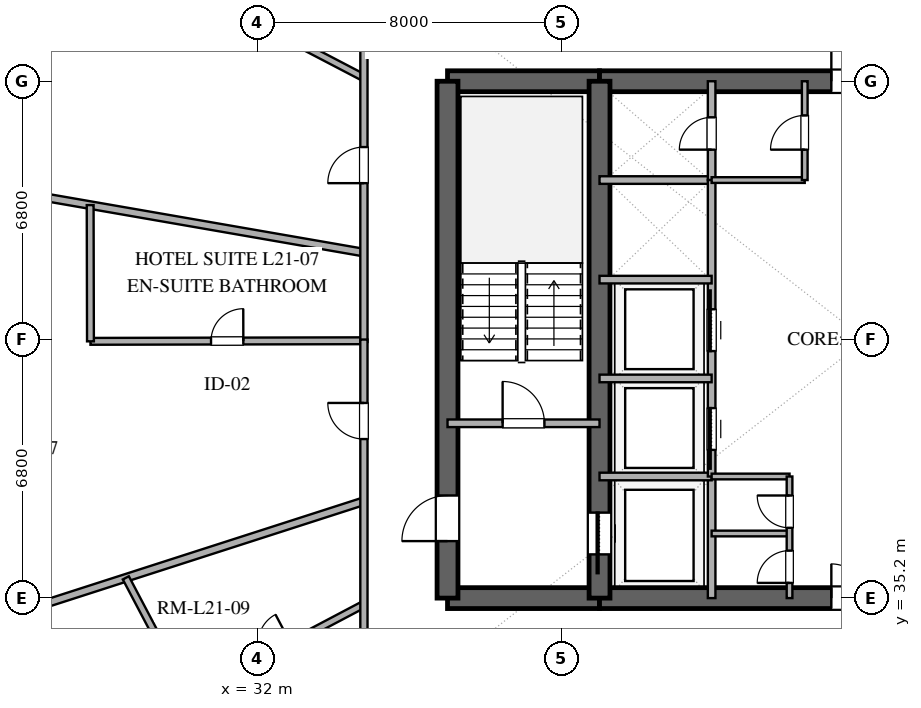
"""IFC4 building model, lengths in metres.
Left out: names, types, materials, properties, quantities, classifications, styles, units other than length and angle.
Written with IfcOpenShell. Run it as: python <this file> out.ifc"""

import sys

from ifc_helpers import new_model, si_unit, direction, frame, frame_2d, origin, place, context, subcontext, project, spatial, rectangle, extrude, element, fill, save


model = new_model("IFC4")
c1 = context("Model", 3, precision=1e-05, world=origin(), true_north=direction((0.0, 1.0)))
c2 = subcontext(c1, "Body", "Model", "MODEL_VIEW")
j1 = project(units=[si_unit("LENGTHUNIT", "METRE"), si_unit("PLANEANGLEUNIT", "RADIAN")], contexts=[c1])
p1 = place(None, origin())
s1 = spatial("IfcSite", under=j1, at=p1, CompositionType="ELEMENT")
p2 = place(p1, origin())
s2 = spatial("IfcBuilding", under=s1, at=p2, CompositionType="ELEMENT")
p3 = place(p2, frame((0.0, 0.0, 87.6)))
s3 = spatial("IfcBuildingStorey", under=s2, at=p3, CompositionType="ELEMENT", Elevation=87.6)
p4 = place(p3, frame((37.0, 35.2, 0.0), z_axis=(0.0, 0.0, 1.0), x_axis=(1.0, 0.0, 0.0)))
e1 = element("IfcWall", 1, at=p4, inside=s3, PredefinedType="SHEAR", context=c2, shape_type="SweptSolid", body=[
    extrude(rectangle(XDim=4.0, YDim=0.55, at=frame_2d((2.0, 0.0))), origin(), (0.0, 0.0, 1.0), 3.38),
])
p5 = place(p3, frame((41.0, 35.2, 0.0), z_axis=(0.0, 0.0, 1.0), x_axis=(1.0, 0.0, 0.0)))
e2 = element("IfcWall", 2, at=p5, inside=s3, PredefinedType="SHEAR", context=c2, shape_type="SweptSolid", body=[
    extrude(rectangle(XDim=14.0, YDim=0.55, at=frame_2d((7.0, 0.0))), origin(), (0.0, 0.0, 1.0), 3.38),
])
p6 = place(p5, frame((6.1, 0.0, 0.0)))
e3 = element("IfcOpeningElement", 3, at=p6, cuts=e2, PredefinedType="OPENING", context=c2, shape_type="SweptSolid", body=[
    extrude(rectangle(XDim=1.8, YDim=2.25, at=frame_2d((0.9, 1.125))), frame((0.0, 0.285, 0.0), z_axis=(0.0, -1.0, 0.0), x_axis=(1.0, 0.0, 0.0)), (0.0, 0.0, 1.0), 0.57),
])
p7 = place(p3, frame((37.0, 48.8, 0.0), z_axis=(0.0, 0.0, 1.0), x_axis=(1.0, 0.0, 0.0)))
e4 = element("IfcWall", 4, at=p7, inside=s3, PredefinedType="SHEAR", context=c2, shape_type="SweptSolid", body=[
    extrude(rectangle(XDim=4.0, YDim=0.55, at=frame_2d((2.0, 0.0))), origin(), (0.0, 0.0, 1.0), 3.38),
])
p8 = place(p3, frame((41.0, 48.8, 0.0), z_axis=(0.0, 0.0, 1.0), x_axis=(1.0, 0.0, 0.0)))
e5 = element("IfcWall", 5, at=p8, inside=s3, PredefinedType="SHEAR", context=c2, shape_type="SweptSolid", body=[
    extrude(rectangle(XDim=14.0, YDim=0.55, at=frame_2d((7.0, 0.0))), origin(), (0.0, 0.0, 1.0), 3.38),
])
p9 = place(p8, frame((6.1, 0.0, 0.0)))
e6 = element("IfcOpeningElement", 6, at=p9, cuts=e5, PredefinedType="OPENING", context=c2, shape_type="SweptSolid", body=[
    extrude(rectangle(XDim=1.8, YDim=2.25, at=frame_2d((0.9, 1.125))), frame((0.0, 0.285, 0.0), z_axis=(0.0, -1.0, 0.0), x_axis=(1.0, 0.0, 0.0)), (0.0, 0.0, 1.0), 0.57),
])
p10 = place(p3, frame((37.0, 35.2, 0.0), z_axis=(0.0, 0.0, 1.0), x_axis=(0.0, 1.0, 0.0)))
e7 = element("IfcWall", 7, at=p10, inside=s3, PredefinedType="SHEAR", context=c2, shape_type="SweptSolid", body=[
    extrude(rectangle(XDim=13.6, YDim=0.55, at=frame_2d((6.8, 0.0))), origin(), (0.0, 0.0, 1.0), 3.38),
])
p11 = place(p10, frame((1.5, 0.0, 0.0)))
e8 = element("IfcOpeningElement", 8, at=p11, cuts=e7, PredefinedType="OPENING", context=c2, shape_type="SweptSolid", body=[
    extrude(rectangle(XDim=1.2, YDim=2.15, at=frame_2d((0.6, 1.075))), frame((0.0, 0.285, 0.0), z_axis=(0.0, -1.0, 0.0), x_axis=(1.0, 0.0, 0.0)), (0.0, 0.0, 1.0), 0.57),
])
p12 = place(p3, frame((41.0, 35.2, 0.0), z_axis=(0.0, 0.0, 1.0), x_axis=(0.0, 1.0, 0.0)))
e9 = element("IfcWall", 9, at=p12, inside=s3, PredefinedType="SHEAR", context=c2, shape_type="SweptSolid", body=[
    extrude(rectangle(XDim=13.6, YDim=0.55, at=frame_2d((6.8, 0.0))), origin(), (0.0, 0.0, 1.0), 3.38),
])
p13 = place(p12, frame((1.15, 0.0, 0.0)))
e10 = element("IfcOpeningElement", 10, at=p13, cuts=e9, PredefinedType="OPENING", context=c2, shape_type="SweptSolid", body=[
    extrude(rectangle(XDim=1.1, YDim=2.2, at=frame_2d((0.55, 1.1))), frame((0.0, 0.285, 0.0), z_axis=(0.0, -1.0, 0.0), x_axis=(1.0, 0.0, 0.0)), (0.0, 0.0, 1.0), 0.57),
])
p14 = place(p3, frame((37.0, 39.8, 0.0), z_axis=(0.0, 0.0, 1.0), x_axis=(1.0, 0.0, 0.0)))
e11 = element("IfcWall", 11, at=p14, inside=s3, PredefinedType="SOLIDWALL", context=c2, shape_type="SweptSolid", body=[
    extrude(rectangle(XDim=4.0, YDim=0.2, at=frame_2d((2.0, 0.0))), origin(), (0.0, 0.0, 1.0), 2.74),
])
p15 = place(p14, frame((1.45, 0.0, 0.0)))
e12 = element("IfcOpeningElement", 12, at=p15, cuts=e11, PredefinedType="OPENING", context=c2, shape_type="SweptSolid", body=[
    extrude(rectangle(XDim=1.1, YDim=2.15, at=frame_2d((0.55, 1.075))), frame((0.0, 0.11, 0.0), z_axis=(0.0, -1.0, 0.0), x_axis=(1.0, 0.0, 0.0)), (0.0, 0.0, 1.0), 0.22),
])
p16 = place(p3, frame((43.95, 35.2, 0.0), z_axis=(0.0, 0.0, 1.0), x_axis=(0.0, 1.0, 0.0)))
e13 = element("IfcWall", 13, at=p16, inside=s3, PredefinedType="SOLIDWALL", context=c2, shape_type="SweptSolid", body=[
    extrude(rectangle(XDim=3.2, YDim=0.2, at=frame_2d((1.6, 0.0))), origin(), (0.0, 0.0, 1.0), 2.74),
])
for number, where, z_axis, x_axis in (
    (14, (41.0, 38.4, 0.0), (0.0, 0.0, 1.0), (1.0, 0.0, 0.0)),
    (15, (41.0, 46.2, 0.0), (0.0, 0.0, 1.0), (1.0, 0.0, 0.0)),
):
    element("IfcWall", number, at=place(p3, frame(where, z_axis=z_axis, x_axis=x_axis)), inside=s3, PredefinedType="SOLIDWALL", context=c2, shape_type="SweptSolid", body=[
        extrude(rectangle(XDim=2.95, YDim=0.2, at=frame_2d((1.475, 0.0))), origin(), (0.0, 0.0, 1.0), 2.74),
    ])
p17 = place(p3, frame((43.95, 46.2, 0.0), z_axis=(0.0, 0.0, 1.0), x_axis=(0.0, 1.0, 0.0)))
e16 = element("IfcWall", 16, at=p17, inside=s3, PredefinedType="SOLIDWALL", context=c2, shape_type="SweptSolid", body=[
    extrude(rectangle(XDim=2.6, YDim=0.2, at=frame_2d((1.3, 0.0))), origin(), (0.0, 0.0, 1.0), 2.74),
])
p18 = place(p17, frame((0.8, 0.0, 0.0)))
e17 = element("IfcOpeningElement", 17, at=p18, cuts=e16, PredefinedType="OPENING", context=c2, shape_type="SweptSolid", body=[
    extrude(rectangle(XDim=0.85, YDim=2.15, at=frame_2d((0.425, 1.075))), frame((0.0, 0.11, 0.0), z_axis=(0.0, -1.0, 0.0), x_axis=(1.0, 0.0, 0.0)), (0.0, 0.0, 1.0), 0.22),
])
p19 = place(p3, frame((43.95, 38.4, 0.0), z_axis=(0.0, 0.0, 1.0), x_axis=(0.0, 1.0, 0.0)))
e18 = element("IfcWall", 18, at=p19, inside=s3, PredefinedType="SOLIDWALL", context=c2, shape_type="SweptSolid", body=[
    extrude(rectangle(XDim=7.8, YDim=0.2, at=frame_2d((3.9, 0.0))), origin(), (0.0, 0.0, 1.0), 2.74),
])
p20 = place(p19, frame((0.7, 0.0, 0.0)))
e19 = element("IfcOpeningElement", 19, at=p20, cuts=e18, PredefinedType="OPENING", context=c2, shape_type="SweptSolid", body=[
    extrude(rectangle(XDim=1.1, YDim=2.2, at=frame_2d((0.55, 1.1))), frame((0.0, 0.11, 0.0), z_axis=(0.0, -1.0, 0.0), x_axis=(1.0, 0.0, 0.0)), (0.0, 0.0, 1.0), 0.22),
])
p21 = place(p19, frame((3.3, 0.0, 0.0)))
e20 = element("IfcOpeningElement", 20, at=p21, cuts=e18, PredefinedType="OPENING", context=c2, shape_type="SweptSolid", body=[
    extrude(rectangle(XDim=1.1, YDim=2.2, at=frame_2d((0.55, 1.1))), frame((0.0, 0.11, 0.0), z_axis=(0.0, -1.0, 0.0), x_axis=(1.0, 0.0, 0.0)), (0.0, 0.0, 1.0), 0.22),
])
for number, where, z_axis, x_axis in (
    (21, (41.0, 40.98, 0.0), (0.0, 0.0, 1.0), (1.0, 0.0, 0.0)),
    (22, (41.0, 43.58, 0.0), (0.0, 0.0, 1.0), (1.0, 0.0, 0.0)),
):
    element("IfcWall", number, at=place(p3, frame(where, z_axis=z_axis, x_axis=x_axis)), inside=s3, PredefinedType="SOLIDWALL", context=c2, shape_type="SweptSolid", body=[
        extrude(rectangle(XDim=2.95, YDim=0.2, at=frame_2d((1.475, 0.0))), origin(), (0.0, 0.0, 1.0), 2.74),
    ])
for number, where, z_axis, x_axis in (
    (23, (43.95, 36.9, 0.0), (0.0, 0.0, 1.0), (1.0, 0.0, 0.0)),
    (24, (43.95, 38.4, 0.0), (0.0, 0.0, 1.0), (1.0, 0.0, 0.0)),
):
    element("IfcWall", number, at=place(p3, frame(where, z_axis=z_axis, x_axis=x_axis)), inside=s3, PredefinedType="PARTITIONING", context=c2, shape_type="SweptSolid", body=[
        extrude(rectangle(XDim=2.05, YDim=0.15, at=frame_2d((1.025, 0.0))), origin(), (0.0, 0.0, 1.0), 2.74),
    ])
p22 = place(p3, frame((46.0, 35.2, 0.0), z_axis=(0.0, 0.0, 1.0), x_axis=(0.0, 1.0, 0.0)))
e25 = element("IfcWall", 25, at=p22, inside=s3, PredefinedType="PARTITIONING", context=c2, shape_type="SweptSolid", body=[
    extrude(rectangle(XDim=3.2, YDim=0.15, at=frame_2d((1.6, 0.0))), origin(), (0.0, 0.0, 1.0), 2.74),
])
p23 = place(p22, frame((0.4, 0.0, 0.0)))
e26 = element("IfcOpeningElement", 26, at=p23, cuts=e25, PredefinedType="OPENING", context=c2, shape_type="SweptSolid", body=[
    extrude(rectangle(XDim=0.85, YDim=2.15, at=frame_2d((0.425, 1.075))), frame((0.0, 0.085, 0.0), z_axis=(0.0, -1.0, 0.0), x_axis=(1.0, 0.0, 0.0)), (0.0, 0.0, 1.0), 0.17),
])
p24 = place(p22, frame((1.85, 0.0, 0.0)))
e27 = element("IfcOpeningElement", 27, at=p24, cuts=e25, PredefinedType="OPENING", context=c2, shape_type="SweptSolid", body=[
    extrude(rectangle(XDim=0.85, YDim=2.15, at=frame_2d((0.425, 1.075))), frame((0.0, 0.085, 0.0), z_axis=(0.0, -1.0, 0.0), x_axis=(1.0, 0.0, 0.0)), (0.0, 0.0, 1.0), 0.17),
])
p25 = place(p3, frame((43.95, 46.2, 0.0), z_axis=(0.0, 0.0, 1.0), x_axis=(1.0, 0.0, 0.0)))
e28 = element("IfcWall", 28, at=p25, inside=s3, PredefinedType="PARTITIONING", context=c2, shape_type="SweptSolid", body=[
    extrude(rectangle(XDim=2.45, YDim=0.15, at=frame_2d((1.225, 0.0))), origin(), (0.0, 0.0, 1.0), 2.74),
])
p26 = place(p3, frame((46.4, 46.2, 0.0), z_axis=(0.0, 0.0, 1.0), x_axis=(0.0, 1.0, 0.0)))
e29 = element("IfcWall", 29, at=p26, inside=s3, PredefinedType="PARTITIONING", context=c2, shape_type="SweptSolid", body=[
    extrude(rectangle(XDim=2.6, YDim=0.15, at=frame_2d((1.3, 0.0))), origin(), (0.0, 0.0, 1.0), 2.74),
])
p27 = place(p26, frame((0.8, 0.0, 0.0)))
e30 = element("IfcOpeningElement", 30, at=p27, cuts=e29, PredefinedType="OPENING", context=c2, shape_type="SweptSolid", body=[
    extrude(rectangle(XDim=0.9, YDim=2.15, at=frame_2d((0.45, 1.075))), frame((0.0, 0.085, 0.0), z_axis=(0.0, -1.0, 0.0), x_axis=(1.0, 0.0, 0.0)), (0.0, 0.0, 1.0), 0.17),
])
p28 = place(p3, frame((34.8, 37.75, 0.0), z_axis=(0.0, 0.0, 1.0), x_axis=(-0.951880556228, -0.306469258939, 0.0)))
e31 = element("IfcWall", 31, at=p28, inside=s3, PredefinedType="PARTITIONING", context=c2, shape_type="SweptSolid", body=[
    extrude(rectangle(XDim=14.428, YDim=0.2, at=frame_2d((7.214, 0.0))), origin(), (0.0, 0.0, 1.0), 2.74),
])
p29 = place(p3, frame((34.8, 44.291, 0.0), z_axis=(0.0, 0.0, 1.0), x_axis=(-0.985271938133, 0.170994759944, 0.0)))
e32 = element("IfcWall", 32, at=p29, inside=s3, PredefinedType="PARTITIONING", context=c2, shape_type="SweptSolid", body=[
    extrude(rectangle(XDim=14.872, YDim=0.2, at=frame_2d((7.436, 0.0))), origin(), (0.0, 0.0, 1.0), 2.74),
])
p30 = place(p3, frame((27.604, 41.956, 0.0), z_axis=(0.0, 0.0, 1.0), x_axis=(0.999997715604, 0.002137472216, 0.0)))
e33 = element("IfcWall", 33, at=p30, inside=s3, PredefinedType="PLUMBINGWALL", context=c2, shape_type="SweptSolid", body=[
    extrude(rectangle(XDim=7.196, YDim=0.18, at=frame_2d((3.598, 0.0))), origin(), (0.0, 0.0, 1.0), 2.74),
])
p31 = place(p30, frame((3.173, 0.0, 0.0)))
e34 = element("IfcOpeningElement", 34, at=p31, cuts=e33, PredefinedType="OPENING", context=c2, shape_type="SweptSolid", body=[
    extrude(rectangle(XDim=0.85, YDim=2.1, at=frame_2d((0.425, 1.05))), frame((0.0, 0.1, 0.0), z_axis=(0.0, -1.0, 0.0), x_axis=(1.0, 0.0, 0.0)), (0.0, 0.0, 1.0), 0.2),
])
p32 = place(p3, frame((30.126, 51.332, 0.0), z_axis=(0.0, 0.0, 1.0), x_axis=(0.886465103711, -0.462795440668, 0.0)))
e35 = element("IfcWall", 35, at=p32, inside=s3, PredefinedType="PLUMBINGWALL", context=c2, shape_type="SweptSolid", body=[
    extrude(rectangle(XDim=5.273, YDim=0.18, at=frame_2d((2.636, 0.0))), origin(), (0.0, 0.0, 1.0), 2.74),
])
p33 = place(p32, frame((2.211, 0.0, 0.0)))
e36 = element("IfcOpeningElement", 36, at=p33, cuts=e35, PredefinedType="OPENING", context=c2, shape_type="SweptSolid", body=[
    extrude(rectangle(XDim=0.85, YDim=2.1, at=frame_2d((0.425, 1.05))), frame((0.0, 0.1, 0.0), z_axis=(0.0, -1.0, 0.0), x_axis=(1.0, 0.0, 0.0)), (0.0, 0.0, 1.0), 0.2),
])
p34 = place(p3, frame((30.187, 32.602, 0.0), z_axis=(0.0, 0.0, 1.0), x_axis=(0.884469007168, 0.466598944877, 0.0)))
e37 = element("IfcWall", 37, at=p34, inside=s3, PredefinedType="PLUMBINGWALL", context=c2, shape_type="SweptSolid", body=[
    extrude(rectangle(XDim=5.216, YDim=0.18, at=frame_2d((2.608, 0.0))), origin(), (0.0, 0.0, 1.0), 2.74),
])
p35 = place(p34, frame((2.183, 0.0, 0.0)))
e38 = element("IfcOpeningElement", 38, at=p35, cuts=e37, PredefinedType="OPENING", context=c2, shape_type="SweptSolid", body=[
    extrude(rectangle(XDim=0.85, YDim=2.1, at=frame_2d((0.425, 1.05))), frame((0.0, 0.1, 0.0), z_axis=(0.0, -1.0, 0.0), x_axis=(1.0, 0.0, 0.0)), (0.0, 0.0, 1.0), 0.2),
])
p36 = place(p3, frame((34.8, 41.94, 0.0), z_axis=(0.0, 0.0, 1.0), x_axis=(0.0, 1.0, 0.0)))
e39 = element("IfcWall", 39, at=p36, inside=s3, PredefinedType="PARTITIONING", context=c2, shape_type="SweptSolid", body=[
    extrude(rectangle(XDim=9.06, YDim=0.19, at=frame_2d((4.53, 0.0))), origin(), (0.0, 0.0, 1.0), 2.74),
])
p37 = place(p36, frame((4.179, 0.0, 0.0)))
e40 = element("IfcOpeningElement", 40, at=p37, cuts=e39, PredefinedType="OPENING", context=c2, shape_type="SweptSolid", body=[
    extrude(rectangle(XDim=0.95, YDim=2.15, at=frame_2d((0.475, 1.075))), frame((0.0, 0.105, 0.0), z_axis=(0.0, -1.0, 0.0), x_axis=(1.0, 0.0, 0.0)), (0.0, 0.0, 1.0), 0.21),
])
p38 = place(p3, frame((34.8, 33.0, 0.0), z_axis=(0.0, 0.0, 1.0), x_axis=(0.0, 1.0, 0.0)))
e41 = element("IfcWall", 41, at=p38, inside=s3, PredefinedType="PARTITIONING", context=c2, shape_type="SweptSolid", body=[
    extrude(rectangle(XDim=9.004, YDim=0.19, at=frame_2d((4.502, 0.0))), origin(), (0.0, 0.0, 1.0), 2.74),
])
p39 = place(p38, frame((6.385, 0.0, 0.0)))
e42 = element("IfcOpeningElement", 42, at=p39, cuts=e41, PredefinedType="OPENING", context=c2, shape_type="SweptSolid", body=[
    extrude(rectangle(XDim=0.95, YDim=2.15, at=frame_2d((0.475, 1.075))), frame((0.0, 0.105, 0.0), z_axis=(0.0, -1.0, 0.0), x_axis=(1.0, 0.0, 0.0)), (0.0, 0.0, 1.0), 0.21),
])
p40 = place(p3, frame((27.596, 45.541, 0.0), z_axis=(0.0, 0.0, 1.0), x_axis=(0.002179237538, -0.999997625459, 0.0)))
e43 = element("IfcWall", 43, at=p40, inside=s3, PredefinedType="PLUMBINGWALL", context=c2, shape_type="SweptSolid", body=[
    extrude(rectangle(XDim=3.585, YDim=0.18, at=frame_2d((1.792, 0.0))), origin(), (0.0, 0.0, 1.0), 2.74),
])
p41 = place(p3, frame((28.535, 35.733, 0.0), z_axis=(0.0, 0.0, 1.0), x_axis=(0.466638742987, -0.884448010651, 0.0)))
e44 = element("IfcWall", 44, at=p41, inside=s3, PredefinedType="PLUMBINGWALL", context=c2, shape_type="SweptSolid", body=[
    extrude(rectangle(XDim=3.54, YDim=0.18, at=frame_2d((1.77, 0.0))), origin(), (0.0, 0.0, 1.0), 2.74),
])
p42 = place(p13, origin())
e45 = element("IfcDoor", 45, at=p42, inside=s3, OperationType="SLIDING_TO_LEFT", PredefinedType="DOOR", context=c2, shape_type="SweptSolid", body=[
    extrude(rectangle(XDim=1.1, YDim=2.2, at=frame_2d((0.55, 1.1))), frame((0.0, 0.025, 0.0), z_axis=(0.0, -1.0, 0.0), x_axis=(1.0, 0.0, 0.0)), (0.0, 0.0, 1.0), 0.05),
])
fill(e10, e45)
p43 = place(p11, origin())
e46 = element("IfcDoor", 46, at=p43, inside=s3, OperationType="SINGLE_SWING_LEFT", PredefinedType="DOOR", context=c2, shape_type="SweptSolid", body=[
    extrude(rectangle(XDim=1.2, YDim=2.15, at=frame_2d((0.6, 1.075))), frame((0.0, 0.025, 0.0), z_axis=(0.0, -1.0, 0.0), x_axis=(1.0, 0.0, 0.0)), (0.0, 0.0, 1.0), 0.05),
])
fill(e8, e46)
p44 = place(p6, origin())
e47 = element("IfcDoor", 47, at=p44, inside=s3, OperationType="DOUBLE_DOOR_SINGLE_SWING", PredefinedType="DOOR", context=c2, shape_type="SweptSolid", body=[
    extrude(rectangle(XDim=1.8, YDim=2.25, at=frame_2d((0.9, 1.125))), frame((0.0, 0.025, 0.0), z_axis=(0.0, -1.0, 0.0), x_axis=(1.0, 0.0, 0.0)), (0.0, 0.0, 1.0), 0.05),
])
fill(e3, e47)
p45 = place(p9, origin())
e48 = element("IfcDoor", 48, at=p45, inside=s3, OperationType="DOUBLE_DOOR_SINGLE_SWING", PredefinedType="DOOR", context=c2, shape_type="SweptSolid", body=[
    extrude(rectangle(XDim=1.8, YDim=2.25, at=frame_2d((0.9, 1.125))), frame((0.0, 0.025, 0.0), z_axis=(0.0, -1.0, 0.0), x_axis=(1.0, 0.0, 0.0)), (0.0, 0.0, 1.0), 0.05),
])
fill(e6, e48)
p46 = place(p15, origin())
e49 = element("IfcDoor", 49, at=p46, inside=s3, OperationType="SINGLE_SWING_LEFT", PredefinedType="DOOR", context=c2, shape_type="SweptSolid", body=[
    extrude(rectangle(XDim=1.1, YDim=2.15, at=frame_2d((0.55, 1.075))), frame((0.0, 0.025, 0.0), z_axis=(0.0, -1.0, 0.0), x_axis=(1.0, 0.0, 0.0)), (0.0, 0.0, 1.0), 0.05),
])
fill(e12, e49)
p47 = place(p18, origin())
e50 = element("IfcDoor", 50, at=p47, inside=s3, OperationType="SINGLE_SWING_LEFT", PredefinedType="DOOR", context=c2, shape_type="SweptSolid", body=[
    extrude(rectangle(XDim=0.85, YDim=2.15, at=frame_2d((0.425, 1.075))), frame((0.0, 0.025, 0.0), z_axis=(0.0, -1.0, 0.0), x_axis=(1.0, 0.0, 0.0)), (0.0, 0.0, 1.0), 0.05),
])
fill(e17, e50)
p48 = place(p20, origin())
e51 = element("IfcDoor", 51, at=p48, inside=s3, OperationType="SLIDING_TO_LEFT", PredefinedType="DOOR", context=c2, shape_type="SweptSolid", body=[
    extrude(rectangle(XDim=1.1, YDim=2.2, at=frame_2d((0.55, 1.1))), frame((0.0, 0.025, 0.0), z_axis=(0.0, -1.0, 0.0), x_axis=(1.0, 0.0, 0.0)), (0.0, 0.0, 1.0), 0.05),
])
fill(e19, e51)
p49 = place(p21, origin())
e52 = element("IfcDoor", 52, at=p49, inside=s3, OperationType="SLIDING_TO_RIGHT", PredefinedType="DOOR", context=c2, shape_type="SweptSolid", body=[
    extrude(rectangle(XDim=1.1, YDim=2.2, at=frame_2d((0.55, 1.1))), frame((0.0, 0.025, 0.0), z_axis=(0.0, -1.0, 0.0), x_axis=(1.0, 0.0, 0.0)), (0.0, 0.0, 1.0), 0.05),
])
fill(e20, e52)
p50 = place(p23, origin())
e53 = element("IfcDoor", 53, at=p50, inside=s3, OperationType="SINGLE_SWING_LEFT", PredefinedType="DOOR", context=c2, shape_type="SweptSolid", body=[
    extrude(rectangle(XDim=0.85, YDim=2.15, at=frame_2d((0.425, 1.075))), frame((0.0, 0.025, 0.0), z_axis=(0.0, -1.0, 0.0), x_axis=(1.0, 0.0, 0.0)), (0.0, 0.0, 1.0), 0.05),
])
fill(e26, e53)
p51 = place(p24, origin())
e54 = element("IfcDoor", 54, at=p51, inside=s3, OperationType="SINGLE_SWING_RIGHT", PredefinedType="DOOR", context=c2, shape_type="SweptSolid", body=[
    extrude(rectangle(XDim=0.85, YDim=2.15, at=frame_2d((0.425, 1.075))), frame((0.0, 0.025, 0.0), z_axis=(0.0, -1.0, 0.0), x_axis=(1.0, 0.0, 0.0)), (0.0, 0.0, 1.0), 0.05),
])
fill(e27, e54)
p52 = place(p27, origin())
e55 = element("IfcDoor", 55, at=p52, inside=s3, OperationType="SINGLE_SWING_LEFT", PredefinedType="DOOR", context=c2, shape_type="SweptSolid", body=[
    extrude(rectangle(XDim=0.9, YDim=2.15, at=frame_2d((0.45, 1.075))), frame((0.0, 0.025, 0.0), z_axis=(0.0, -1.0, 0.0), x_axis=(1.0, 0.0, 0.0)), (0.0, 0.0, 1.0), 0.05),
])
fill(e30, e55)
p53 = place(p31, origin())
e56 = element("IfcDoor", 56, at=p53, inside=s3, OperationType="SINGLE_SWING_RIGHT", PredefinedType="DOOR", context=c2, shape_type="SweptSolid", body=[
    extrude(rectangle(XDim=0.85, YDim=2.1, at=frame_2d((0.425, 1.05))), frame((0.0, 0.025, 0.0), z_axis=(0.0, -1.0, 0.0), x_axis=(1.0, 0.0, 0.0)), (0.0, 0.0, 1.0), 0.05),
])
fill(e34, e56)
p54 = place(p37, origin())
e57 = element("IfcDoor", 57, at=p54, inside=s3, OperationType="SINGLE_SWING_LEFT", PredefinedType="DOOR", context=c2, shape_type="SweptSolid", body=[
    extrude(rectangle(XDim=0.95, YDim=2.15, at=frame_2d((0.475, 1.075))), frame((0.0, 0.025, 0.0), z_axis=(0.0, -1.0, 0.0), x_axis=(1.0, 0.0, 0.0)), (0.0, 0.0, 1.0), 0.05),
])
fill(e40, e57)
p55 = place(p39, origin())
e58 = element("IfcDoor", 58, at=p55, inside=s3, OperationType="SINGLE_SWING_RIGHT", PredefinedType="DOOR", context=c2, shape_type="SweptSolid", body=[
    extrude(rectangle(XDim=0.95, YDim=2.15, at=frame_2d((0.475, 1.075))), frame((0.0, 0.025, 0.0), z_axis=(0.0, -1.0, 0.0), x_axis=(1.0, 0.0, 0.0)), (0.0, 0.0, 1.0), 0.05),
])
fill(e42, e58)
save(model, sys.argv[1])
